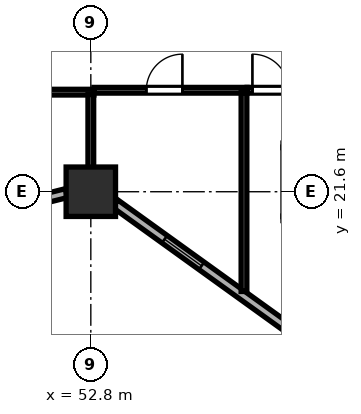
"""IFC4 building model, lengths in metres.
Left out: names, types, materials, properties, quantities, classifications, styles, units other than length and angle.
Written with IfcOpenShell. Run it as: python <this file> out.ifc"""

import sys

from ifc_helpers import new_model, si_unit, direction, frame, frame_2d, origin, origin_2d, place, context, subcontext, project, spatial, rectangle, hollow_rectangle, extrude, element, fill, save


model = new_model("IFC4")
c1 = context("Model", 3, precision=1e-05, world=origin(), true_north=direction((0.0, 1.0)))
c2 = subcontext(c1, "Body", "Model", "MODEL_VIEW")
j1 = project(units=[si_unit("LENGTHUNIT", "METRE"), si_unit("PLANEANGLEUNIT", "RADIAN")], contexts=[c1])
p1 = place(None, origin())
s1 = spatial("IfcSite", under=j1, at=p1, CompositionType="ELEMENT")
p2 = place(p1, origin())
s2 = spatial("IfcBuilding", under=s1, at=p2, CompositionType="ELEMENT")
p3 = place(p2, frame((0.0, 0.0, 39.2)))
s3 = spatial("IfcBuildingStorey", under=s2, at=p3, CompositionType="ELEMENT", Elevation=39.2)
p4 = place(p3, frame((52.8, 21.6, 0.0), z_axis=(0.0, 0.0, 1.0), x_axis=(1.0, 0.0, 0.0)))
e1 = element("IfcColumn", 1, at=p4, inside=s3, PredefinedType="COLUMN", context=c2, shape_type="SweptSolid", body=[
    extrude(hollow_rectangle(XDim=1.3, YDim=1.3, WallThickness=0.048, at=origin_2d()), origin(), (0.0, 0.0, 1.0), 3.8),
])
p5 = place(p3, frame((47.932, 20.507, 0.0), z_axis=(0.0, 0.0, 1.0), x_axis=(0.970135906278, 0.242561998982, 0.0)))
e2 = element("IfcWall", 2, at=p5, inside=s3, PredefinedType="SOLIDWALL", context=c2, shape_type="SweptSolid", body=[
    extrude(rectangle(XDim=4.356, YDim=0.24, at=frame_2d((2.178, 0.0))), origin(), (0.0, 0.0, 1.0), 3.037),
])
p6 = place(p5, frame((1.6, 0.0, 0.85)))
e3 = element("IfcOpeningElement", 3, at=p6, cuts=e2, PredefinedType="OPENING", context=c2, shape_type="SweptSolid", body=[
    extrude(rectangle(XDim=1.2, YDim=1.85, at=frame_2d((0.6, 0.925))), frame((0.0, 0.13, 0.0), z_axis=(0.0, -1.0, 0.0), x_axis=(1.0, 0.0, 0.0)), (0.0, 0.0, 1.0), 0.26),
])
p7 = place(p3, frame((53.442, 21.286, 0.0), z_axis=(0.0, 0.0, 1.0), x_axis=(0.811542842993, -0.584292917967, 0.0)))
e4 = element("IfcWall", 4, at=p7, inside=s3, PredefinedType="SOLIDWALL", context=c2, shape_type="SweptSolid", body=[
    extrude(rectangle(XDim=11.438, YDim=0.24, at=frame_2d((5.719, 0.0))), origin(), (0.0, 0.0, 1.0), 3.037),
])
p8 = place(p7, frame((1.6, 0.0, 0.85)))
e5 = element("IfcOpeningElement", 5, at=p8, cuts=e4, PredefinedType="OPENING", context=c2, shape_type="SweptSolid", body=[
    extrude(rectangle(XDim=1.2, YDim=1.85, at=frame_2d((0.6, 0.925))), frame((0.0, 0.13, 0.0), z_axis=(0.0, -1.0, 0.0), x_axis=(1.0, 0.0, 0.0)), (0.0, 0.0, 1.0), 0.26),
])
p9 = place(p7, frame((7.0, 0.0, 0.85)))
e6 = element("IfcOpeningElement", 6, at=p9, cuts=e4, PredefinedType="OPENING", context=c2, shape_type="SweptSolid", body=[
    extrude(rectangle(XDim=1.2, YDim=1.85, at=frame_2d((0.6, 0.925))), frame((0.0, 0.13, 0.0), z_axis=(0.0, -1.0, 0.0), x_axis=(1.0, 0.0, 0.0)), (0.0, 0.0, 1.0), 0.26),
])
p10 = place(p7, frame((9.669, 0.0, 0.85)))
e7 = element("IfcOpeningElement", 7, at=p10, cuts=e4, PredefinedType="OPENING", context=c2, shape_type="SweptSolid", body=[
    extrude(rectangle(XDim=1.2, YDim=1.85, at=frame_2d((0.6, 0.925))), frame((0.0, 0.13, 0.0), z_axis=(0.0, -1.0, 0.0), x_axis=(1.0, 0.0, 0.0)), (0.0, 0.0, 1.0), 0.26),
])
p11 = place(p3, frame((49.282, 24.22, 0.0), z_axis=(0.0, 0.0, 1.0), x_axis=(1.0, 0.0, 0.0)))
e8 = element("IfcWall", 8, at=p11, inside=s3, PredefinedType="PARTITIONING", context=c2, shape_type="SweptSolid", body=[
    extrude(rectangle(XDim=3.598, YDim=0.15, at=frame_2d((1.799, 0.0))), origin(), (0.0, 0.0, 1.0), 3.54),
])
p12 = place(p11, frame((2.113, 0.0, 0.0), z_axis=(0.0, 0.0, 1.0), x_axis=(-1.0, 0.0, 0.0)))
e9 = element("IfcOpeningElement", 9, at=p12, cuts=e8, PredefinedType="OPENING", context=c2, shape_type="SweptSolid", body=[
    extrude(rectangle(XDim=0.95, YDim=2.12, at=frame_2d((0.475, 1.06))), frame((0.0, 0.085, 0.0), z_axis=(0.0, -1.0, 0.0), x_axis=(1.0, 0.0, 0.0)), (0.0, 0.0, 1.0), 0.17),
])
p13 = place(p3, frame((52.8, 21.819, 0.0), z_axis=(0.0, 0.0, 1.0), x_axis=(0.0, 1.0, 0.0)))
e10 = element("IfcWall", 10, at=p13, inside=s3, PredefinedType="PARTITIONING", context=c2, shape_type="SweptSolid", body=[
    extrude(rectangle(XDim=2.341, YDim=0.15, at=frame_2d((1.171, 0.0))), origin(), (0.0, 0.0, 1.0), 3.037),
])
p14 = place(p3, frame((52.882, 24.27, 0.0), z_axis=(0.0, 0.0, 1.0), x_axis=(1.0, 0.0, 0.0)))
e11 = element("IfcWall", 11, at=p14, inside=s3, PredefinedType="PARTITIONING", context=c2, shape_type="SweptSolid", body=[
    extrude(rectangle(XDim=4.028, YDim=0.15, at=frame_2d((2.014, 0.0))), origin(), (0.0, 0.0, 1.0), 3.54),
])
p15 = place(p14, frame((2.328, 0.0, 0.0), z_axis=(0.0, 0.0, 1.0), x_axis=(-1.0, 0.0, 0.0)))
e12 = element("IfcOpeningElement", 12, at=p15, cuts=e11, PredefinedType="OPENING", context=c2, shape_type="SweptSolid", body=[
    extrude(rectangle(XDim=0.95, YDim=2.12, at=frame_2d((0.475, 1.06))), frame((0.0, 0.085, 0.0), z_axis=(0.0, -1.0, 0.0), x_axis=(1.0, 0.0, 0.0)), (0.0, 0.0, 1.0), 0.17),
])
p16 = place(p3, frame((56.83, 18.976, 0.0), z_axis=(0.0, 0.0, 1.0), x_axis=(0.0, 1.0, 0.0)))
e13 = element("IfcWall", 13, at=p16, inside=s3, PredefinedType="PARTITIONING", context=c2, shape_type="SweptSolid", body=[
    extrude(rectangle(XDim=5.234, YDim=0.15, at=frame_2d((2.617, 0.0))), origin(), (0.0, 0.0, 1.0), 3.54),
])
p17 = place(p3, frame((56.912, 24.27, 0.0), z_axis=(0.0, 0.0, 1.0), x_axis=(1.0, 0.0, 0.0)))
e14 = element("IfcWall", 14, at=p17, inside=s3, PredefinedType="PARTITIONING", context=c2, shape_type="SweptSolid", body=[
    extrude(rectangle(XDim=4.158, YDim=0.15, at=frame_2d((2.079, 0.0))), origin(), (0.0, 0.0, 1.0), 3.54),
])
p18 = place(p17, frame((1.09, 0.0, 0.0), z_axis=(0.0, 0.0, 1.0), x_axis=(-1.0, 0.0, 0.0)))
e15 = element("IfcOpeningElement", 15, at=p18, cuts=e14, PredefinedType="OPENING", context=c2, shape_type="SweptSolid", body=[
    extrude(rectangle(XDim=0.95, YDim=2.15, at=frame_2d((0.475, 1.075))), frame((0.0, 0.085, 0.0), z_axis=(0.0, -1.0, 0.0), x_axis=(1.0, 0.0, 0.0)), (0.0, 0.0, 1.0), 0.17),
])
p19 = place(p8, origin())
e16 = element("IfcWindow", 16, at=p19, inside=s3, PartitioningType="SINGLE_PANEL", PredefinedType="WINDOW", context=c2, shape_type="SweptSolid", body=[
    extrude(rectangle(XDim=1.2, YDim=1.85, at=frame_2d((0.6, 0.925))), frame((0.0, 0.03, 0.0), z_axis=(0.0, -1.0, 0.0), x_axis=(1.0, 0.0, 0.0)), (0.0, 0.0, 1.0), 0.06),
])
fill(e5, e16)
p20 = place(p15, origin())
e17 = element("IfcDoor", 17, at=p20, inside=s3, OperationType="SINGLE_SWING_LEFT", PredefinedType="DOOR", context=c2, shape_type="SweptSolid", body=[
    extrude(rectangle(XDim=0.95, YDim=2.12, at=frame_2d((0.475, 1.06))), frame((0.0, 0.025, 0.0), z_axis=(0.0, -1.0, 0.0), x_axis=(1.0, 0.0, 0.0)), (0.0, 0.0, 1.0), 0.05),
])
fill(e12, e17)
p21 = place(p18, origin())
e18 = element("IfcDoor", 18, at=p21, inside=s3, OperationType="SINGLE_SWING_RIGHT", PredefinedType="DOOR", context=c2, shape_type="SweptSolid", body=[
    extrude(rectangle(XDim=0.95, YDim=2.15, at=frame_2d((0.475, 1.075))), frame((0.0, 0.025, 0.0), z_axis=(0.0, -1.0, 0.0), x_axis=(1.0, 0.0, 0.0)), (0.0, 0.0, 1.0), 0.05),
])
fill(e15, e18)
save(model, sys.argv[1])
